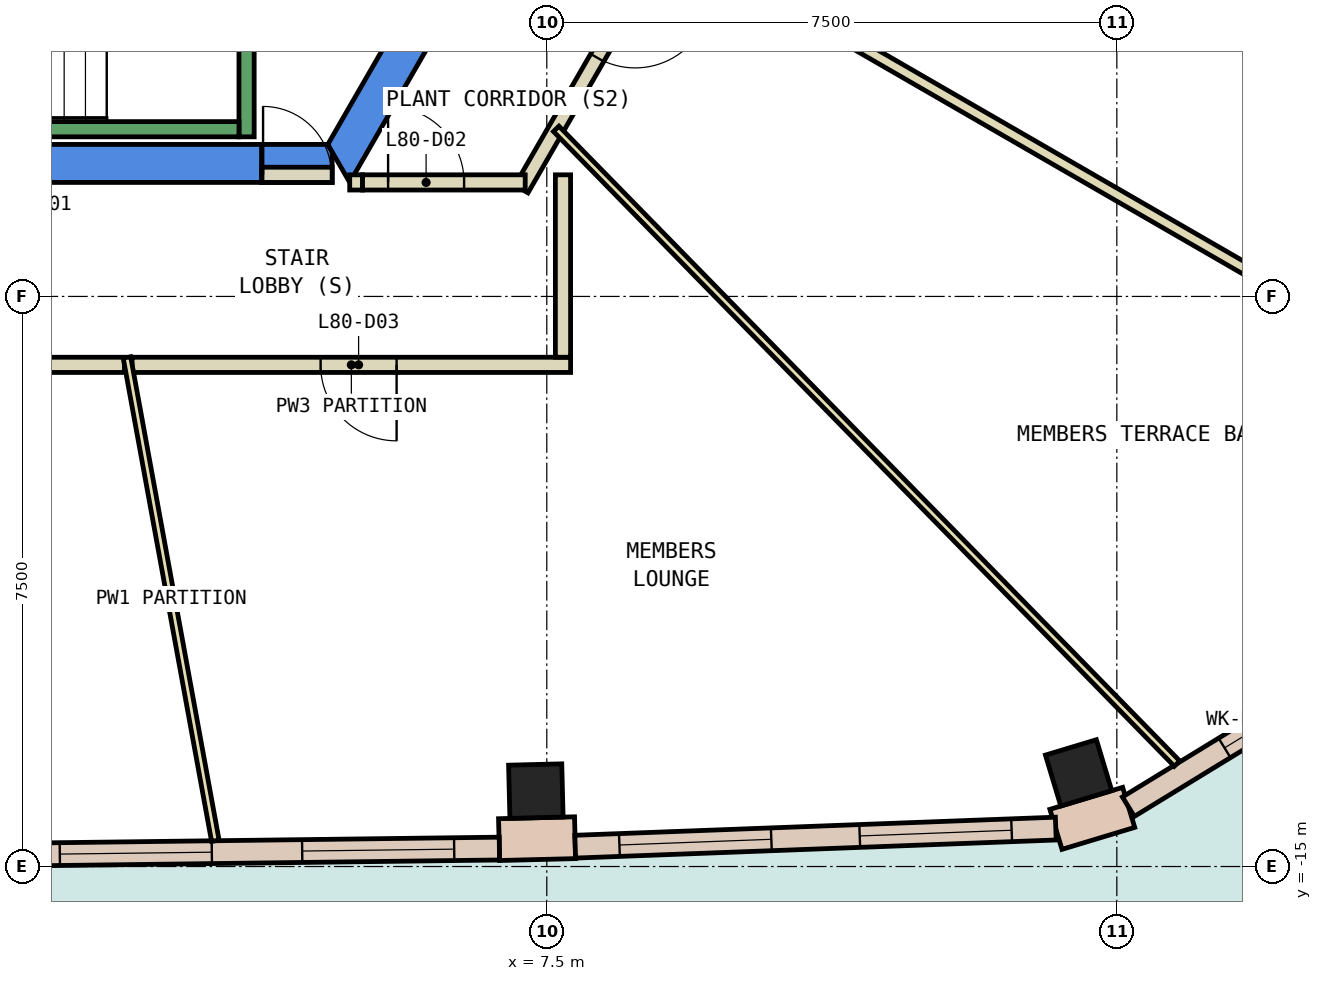
"""IFC4 building model, lengths in metres.
Left out: names, types, materials, properties, quantities, classifications, styles, units other than length and angle.
Written with IfcOpenShell. Run it as: python <this file> out.ifc"""

import sys

from ifc_helpers import new_model, si_unit, direction, frame, frame_2d, origin, origin_2d, place, context, subcontext, project, spatial, polyline, rectangle, outline, extrude, element, fill, save


model = new_model("IFC4")
c1 = context("Model", 3, precision=1e-05, world=origin(), true_north=direction((0.0, 1.0)))
c2 = subcontext(c1, "Body", "Model", "MODEL_VIEW")
j1 = project(units=[si_unit("LENGTHUNIT", "METRE"), si_unit("PLANEANGLEUNIT", "RADIAN")], contexts=[c1])
p1 = place(None, origin())
s1 = spatial("IfcSite", under=j1, at=p1, CompositionType="ELEMENT")
p2 = place(p1, origin())
s2 = spatial("IfcBuilding", under=s1, at=p2, CompositionType="ELEMENT")
p3 = place(p2, frame((0.0, 0.0, 340.4)))
s3 = spatial("IfcBuildingStorey", under=s2, at=p3, CompositionType="ELEMENT", Elevation=340.4)
for number, where, z_axis, x_axis in (
    (1, (7.356, -14.008, 0.0), (0.0, 0.0, 1.0), (1.0, 0.025, 0.0)),
    (2, (14.497, -13.768, 0.0), (0.0, 0.0, 1.0), (0.957, 0.289, 0.0)),
):
    element("IfcColumn", number, at=place(p3, frame(where, z_axis=z_axis, x_axis=x_axis)), inside=s3, PredefinedType="COLUMN", context=c2, shape_type="SweptSolid", body=[
        extrude(rectangle(XDim=0.7, YDim=0.7, at=origin_2d()), origin(), (0.0, 0.0, 1.0), 4.15),
    ])
p4 = place(p3, frame((0.0, 0.0, -0.45)))
e3 = element("IfcWall", 3, at=p4, inside=s3, PredefinedType="SHEAR", context=c2, shape_type="SweptSolid", body=[
    extrude(outline(polyline([(3.75, -6.0), (3.75, -5.5), (-4.619, -5.5), (-4.907, -6.0), (3.75, -6.0)])), origin(), (0.0, 0.0, 1.0), 4.6),
])
p5 = place(p3, frame((0.0, 0.0, 3.6)))
e4 = element("IfcWall", 4, at=p5, inside=s3, PredefinedType="SHEAR", context=c2, shape_type="SweptSolid", body=[
    extrude(outline(polyline([(4.676, -6.0), (4.676, -5.6), (4.619, -5.5), (3.75, -5.5), (3.75, -6.0), (4.676, -6.0)])), origin(), (0.0, 0.0, 1.0), 0.55),
])
p6 = place(p3, frame((0.0, 0.0, -0.45)))
e5 = element("IfcWall", 5, at=p6, inside=s3, PredefinedType="SHEAR", context=c2, shape_type="SweptSolid", body=[
    extrude(outline(polyline([(4.907, -6.0), (9.815, 2.5), (9.238, 2.5), (4.619, -5.5), (4.907, -6.0)])), origin(), (0.0, 0.0, 1.0), 4.6),
])
p7 = place(p3, frame((6.872, -14.646, 0.0), z_axis=(0.0, 0.0, 1.0), x_axis=(0.999690080772, 0.024894626035, 0.0)))
e6 = element("IfcWall", 6, at=p7, inside=s3, PredefinedType="STANDARD", context=c2, shape_type="SweptSolid", body=[
    extrude(rectangle(XDim=1.0, YDim=0.55, at=frame_2d((0.5, 0.0))), origin(), (0.0, 0.0, 1.0), 4.15),
])
p8 = place(p3, frame((14.199, -14.511, 0.0), z_axis=(0.0, 0.0, 1.0), x_axis=(0.957286907321, 0.289139718946, 0.0)))
e7 = element("IfcWall", 7, at=p8, inside=s3, PredefinedType="STANDARD", context=c2, shape_type="SweptSolid", body=[
    extrude(rectangle(XDim=1.0, YDim=0.55, at=frame_2d((0.5, 0.0))), origin(), (0.0, 0.0, 1.0), 4.15),
])
p9 = place(p3, frame((0.499, -14.844, 0.0), z_axis=(0.0, 0.0, 1.0), x_axis=(0.999921164834, 0.012556437292, 0.0)))
e8 = element("IfcWall", 8, at=p9, inside=s3, PredefinedType="STANDARD", context=c2, shape_type="SweptSolid", body=[
    extrude(rectangle(XDim=6.377, YDim=0.3, at=frame_2d((3.189, 0.0))), origin(), (0.0, 0.0, 1.0), 4.15),
])
p10 = place(p9, frame((0.594, 0.0, 0.9)))
e9 = element("IfcOpeningElement", 9, at=p10, cuts=e8, PredefinedType="OPENING", context=c2, shape_type="SweptSolid", body=[
    extrude(rectangle(XDim=2.0, YDim=3.0, at=frame_2d((1.0, 1.5))), frame((0.0, 0.16, 0.0), z_axis=(0.0, -1.0, 0.0), x_axis=(1.0, 0.0, 0.0)), (0.0, 0.0, 1.0), 0.32),
])
p11 = place(p9, frame((3.783, 0.0, 0.9)))
e10 = element("IfcOpeningElement", 10, at=p11, cuts=e8, PredefinedType="OPENING", context=c2, shape_type="SweptSolid", body=[
    extrude(rectangle(XDim=2.0, YDim=3.0, at=frame_2d((1.0, 1.5))), frame((0.0, 0.16, 0.0), z_axis=(0.0, -1.0, 0.0), x_axis=(1.0, 0.0, 0.0)), (0.0, 0.0, 1.0), 0.32),
])
p12 = place(p3, frame((7.874, -14.739, 0.0), z_axis=(0.0, 0.0, 1.0), x_axis=(0.999292132587, 0.03761959262, 0.0)))
e11 = element("IfcWall", 11, at=p12, inside=s3, PredefinedType="STANDARD", context=c2, shape_type="SweptSolid", body=[
    extrude(rectangle(XDim=6.327, YDim=0.3, at=frame_2d((3.164, 0.0))), origin(), (0.0, 0.0, 1.0), 4.15),
])
p13 = place(p12, frame((0.582, 0.0, 0.9)))
e12 = element("IfcOpeningElement", 12, at=p13, cuts=e11, PredefinedType="OPENING", context=c2, shape_type="SweptSolid", body=[
    extrude(rectangle(XDim=2.0, YDim=3.0, at=frame_2d((1.0, 1.5))), frame((0.0, 0.16, 0.0), z_axis=(0.0, -1.0, 0.0), x_axis=(1.0, 0.0, 0.0)), (0.0, 0.0, 1.0), 0.32),
])
p14 = place(p12, frame((3.746, 0.0, 0.9)))
e13 = element("IfcOpeningElement", 13, at=p14, cuts=e11, PredefinedType="OPENING", context=c2, shape_type="SweptSolid", body=[
    extrude(rectangle(XDim=2.0, YDim=3.0, at=frame_2d((1.0, 1.5))), frame((0.0, 0.16, 0.0), z_axis=(0.0, -1.0, 0.0), x_axis=(1.0, 0.0, 0.0)), (0.0, 0.0, 1.0), 0.32),
])
p15 = place(p3, frame((15.152, -14.213, 0.0), z_axis=(0.0, 0.0, 1.0), x_axis=(0.853225151066, 0.521542751448, 0.0)))
e14 = element("IfcWall", 14, at=p15, inside=s3, PredefinedType="STANDARD", context=c2, shape_type="SweptSolid", body=[
    extrude(rectangle(XDim=4.366, YDim=0.3, at=frame_2d((2.183, 0.0))), origin(), (0.0, 0.0, 1.0), 4.15),
])
p16 = place(p15, frame((1.483, 0.0, 0.9)))
e15 = element("IfcOpeningElement", 15, at=p16, cuts=e14, PredefinedType="OPENING", context=c2, shape_type="SweptSolid", body=[
    extrude(rectangle(XDim=1.4, YDim=3.0, at=frame_2d((0.7, 1.5))), frame((0.0, 0.16, 0.0), z_axis=(0.0, -1.0, 0.0), x_axis=(1.0, 0.0, 0.0)), (0.0, 0.0, 1.0), 0.32),
])
p17 = place(p3, frame((19.657, -5.044, 0.0), z_axis=(0.0, 0.0, 1.0), x_axis=(-0.467155191513, 0.884175337274, 0.0)))
e16 = element("IfcWall", 16, at=p17, inside=s3, PredefinedType="STANDARD", context=c2, shape_type="SweptSolid", body=[
    extrude(rectangle(XDim=6.326, YDim=0.3, at=frame_2d((3.163, 0.0))), origin(), (0.0, 0.0, 1.0), 4.15),
])
p18 = place(p17, frame((0.581, 0.0, 0.9)))
e17 = element("IfcOpeningElement", 17, at=p18, cuts=e16, PredefinedType="OPENING", context=c2, shape_type="SweptSolid", body=[
    extrude(rectangle(XDim=2.0, YDim=3.0, at=frame_2d((1.0, 1.5))), frame((0.0, 0.16, 0.0), z_axis=(0.0, -1.0, 0.0), x_axis=(1.0, 0.0, 0.0)), (0.0, 0.0, 1.0), 0.32),
])
p19 = place(p17, frame((3.744, 0.0, 0.9)))
e18 = element("IfcOpeningElement", 18, at=p19, cuts=e16, PredefinedType="OPENING", context=c2, shape_type="SweptSolid", body=[
    extrude(rectangle(XDim=2.0, YDim=3.0, at=frame_2d((1.0, 1.5))), frame((0.0, 0.16, 0.0), z_axis=(0.0, -1.0, 0.0), x_axis=(1.0, 0.0, 0.0)), (0.0, 0.0, 1.0), 0.32),
])
p20 = place(p3, frame((4.907, -6.0, 0.0), z_axis=(0.0, 0.0, 1.0), x_axis=(1.0, 0.0, 0.0)))
e19 = element("IfcWall", 19, at=p20, inside=s3, PredefinedType="PARTITIONING", context=c2, shape_type="SweptSolid", body=[
    extrude(rectangle(XDim=0.169, YDim=0.2, at=frame_2d((0.084, 0.0))), origin(), (0.0, 0.0, 1.0), 2.4),
])
p21 = place(p3, frame((7.813, -8.4, 0.0), z_axis=(0.0, 0.0, 1.0), x_axis=(-1.0, 0.0, 0.0)))
e20 = element("IfcWall", 20, at=p21, inside=s3, PredefinedType="PARTITIONING", context=c2, shape_type="SweptSolid", body=[
    extrude(rectangle(XDim=5.769, YDim=0.2, at=frame_2d((2.885, 0.0))), origin(), (0.0, 0.0, 1.0), 4.15),
])
p22 = place(p21, frame((2.289, 0.0, 0.0)))
e21 = element("IfcOpeningElement", 21, at=p22, cuts=e20, PredefinedType="OPENING", context=c2, shape_type="SweptSolid", body=[
    extrude(rectangle(XDim=1.0, YDim=2.1, at=frame_2d((0.5, 1.05))), frame((0.0, 0.11, 0.0), z_axis=(0.0, -1.0, 0.0), x_axis=(1.0, 0.0, 0.0)), (0.0, 0.0, 1.0), 0.22),
])
p23 = place(p3, frame((7.713, -5.9, 0.0), z_axis=(0.0, 0.0, 1.0), x_axis=(0.0, -1.0, 0.0)))
e22 = element("IfcWall", 22, at=p23, inside=s3, PredefinedType="PARTITIONING", context=c2, shape_type="SweptSolid", body=[
    extrude(rectangle(XDim=2.4, YDim=0.2, at=frame_2d((1.2, 0.0))), origin(), (0.0, 0.0, 1.0), 4.15),
])
p24 = place(p3, frame((1.944, -8.4, 0.0), z_axis=(0.0, 0.0, 1.0), x_axis=(-1.0, 0.0, 0.0)))
e23 = element("IfcWall", 23, at=p24, inside=s3, PredefinedType="PARTITIONING", context=c2, shape_type="SweptSolid", body=[
    extrude(rectangle(XDim=1.331, YDim=0.2, at=frame_2d((0.666, 0.0))), origin(), (0.0, 0.0, 1.0), 4.15),
])
p25 = place(p3, frame((9.106, -2.728, 0.0), z_axis=(0.0, 0.0, 1.0), x_axis=(-0.500132879116, -0.865948672398, 0.0)))
e24 = element("IfcWall", 24, at=p25, inside=s3, PredefinedType="PARTITIONING", context=c2, shape_type="SweptSolid", body=[
    extrude(rectangle(XDim=3.879, YDim=0.2, at=frame_2d((1.939, 0.0))), origin(), (0.0, 0.0, 1.0), 4.15),
])
p26 = place(p25, frame((0.884, 0.0, 0.0)))
e25 = element("IfcOpeningElement", 25, at=p26, cuts=e24, PredefinedType="OPENING", context=c2, shape_type="SweptSolid", body=[
    extrude(rectangle(XDim=1.0, YDim=2.1, at=frame_2d((0.5, 1.05))), frame((0.0, 0.11, 0.0), z_axis=(0.0, -1.0, 0.0), x_axis=(1.0, 0.0, 0.0)), (0.0, 0.0, 1.0), 0.22),
])
p27 = place(p3, frame((3.139, -14.661, 0.0), z_axis=(0.0, 0.0, 1.0), x_axis=(-0.179885726398, 0.983687514121, 0.0)))
e26 = element("IfcWall", 26, at=p27, inside=s3, PredefinedType="PARTITIONING", context=c2, shape_type="SweptSolid", body=[
    extrude(rectangle(XDim=6.464, YDim=0.1, at=frame_2d((3.232, 0.0))), origin(), (0.0, 0.0, 1.0), 4.15),
])
p28 = place(p3, frame((7.624, -5.295, 0.0), z_axis=(0.0, 0.0, 1.0), x_axis=(0.699225895869, -0.714900794898, 0.0)))
e27 = element("IfcWall", 27, at=p28, inside=s3, PredefinedType="PARTITIONING", context=c2, shape_type="SweptSolid", body=[
    extrude(rectangle(XDim=11.681, YDim=0.1, at=frame_2d((5.841, 0.0))), origin(), (0.0, 0.0, 1.0), 4.15),
])
p29 = place(p3, frame((19.664, -8.853, 0.0), z_axis=(0.0, 0.0, 1.0), x_axis=(-0.866035935173, 0.499981758657, 0.0)))
e28 = element("IfcWall", 28, at=p29, inside=s3, PredefinedType="PARTITIONING", context=c2, shape_type="SweptSolid", body=[
    extrude(rectangle(XDim=12.307, YDim=0.15, at=frame_2d((6.153, 0.0))), origin(), (0.0, 0.0, 1.0), 4.15),
])
p30 = place(p3, frame((3.75, -5.9, 0.0), z_axis=(0.0, 0.0, 1.0), x_axis=(1.0, 0.0, 0.0)))
e29 = element("IfcWall", 29, at=p30, inside=s3, PredefinedType="PARTITIONING", context=c2, shape_type="SweptSolid", body=[
    extrude(rectangle(XDim=0.926, YDim=0.2, at=frame_2d((0.463, 0.0))), origin(), (0.0, 0.0, 1.0), 2.4),
])
p31 = place(p30, frame((0.017, 0.0, 0.0)))
e30 = element("IfcOpeningElement", 30, at=p31, cuts=e29, PredefinedType="OPENING", context=c2, shape_type="SweptSolid", body=[
    extrude(rectangle(XDim=0.9, YDim=2.1, at=frame_2d((0.45, 1.05))), frame((0.0, 0.11, 0.0), z_axis=(0.0, -1.0, 0.0), x_axis=(1.0, 0.0, 0.0)), (0.0, 0.0, 1.0), 0.22),
])
p32 = place(p3, frame((5.076, -6.0, 0.0), z_axis=(0.0, 0.0, 1.0), x_axis=(1.0, 0.0, 0.0)))
e31 = element("IfcWall", 31, at=p32, inside=s3, PredefinedType="PARTITIONING", context=c2, shape_type="SweptSolid", body=[
    extrude(rectangle(XDim=2.14, YDim=0.2, at=frame_2d((1.07, 0.0))), origin(), (0.0, 0.0, 1.0), 4.15),
])
p33 = place(p32, frame((0.336, 0.0, 0.0)))
e32 = element("IfcOpeningElement", 32, at=p33, cuts=e31, PredefinedType="OPENING", context=c2, shape_type="SweptSolid", body=[
    extrude(rectangle(XDim=1.0, YDim=2.1, at=frame_2d((0.5, 1.05))), frame((0.0, 0.11, 0.0), z_axis=(0.0, -1.0, 0.0), x_axis=(1.0, 0.0, 0.0)), (0.0, 0.0, 1.0), 0.22),
])
p34 = place(p3, frame((3.55, -2.667, 0.0), z_axis=(0.0, 0.0, 1.0), x_axis=(0.0, -1.0, 0.0)))
e33 = element("IfcWall", 33, at=p34, inside=s3, PredefinedType="STANDARD", context=c2, shape_type="SweptSolid", body=[
    extrude(rectangle(XDim=2.733, YDim=0.2, at=frame_2d((1.366, 0.0))), origin(), (0.0, 0.0, 1.0), 4.15),
])
p35 = place(p3, frame((-3.45, -5.3, 0.0), z_axis=(0.0, 0.0, 1.0), x_axis=(1.0, 0.0, 0.0)))
e34 = element("IfcWall", 34, at=p35, inside=s3, PredefinedType="STANDARD", context=c2, shape_type="SweptSolid", body=[
    extrude(rectangle(XDim=6.9, YDim=0.2, at=frame_2d((3.45, 0.0))), origin(), (0.0, 0.0, 1.0), 4.15),
])
p36 = place(p10, origin())
e35 = element("IfcWindow", 35, at=p36, inside=s3, PartitioningType="SINGLE_PANEL", PredefinedType="WINDOW", context=c2, shape_type="SweptSolid", body=[
    extrude(rectangle(XDim=2.0, YDim=3.0, at=frame_2d((1.0, 1.5))), frame((0.0, 0.03, 0.0), z_axis=(0.0, -1.0, 0.0), x_axis=(1.0, 0.0, 0.0)), (0.0, 0.0, 1.0), 0.06),
])
fill(e9, e35)
p37 = place(p11, origin())
e36 = element("IfcWindow", 36, at=p37, inside=s3, PartitioningType="SINGLE_PANEL", PredefinedType="WINDOW", context=c2, shape_type="SweptSolid", body=[
    extrude(rectangle(XDim=2.0, YDim=3.0, at=frame_2d((1.0, 1.5))), frame((0.0, 0.03, 0.0), z_axis=(0.0, -1.0, 0.0), x_axis=(1.0, 0.0, 0.0)), (0.0, 0.0, 1.0), 0.06),
])
fill(e10, e36)
p38 = place(p13, origin())
e37 = element("IfcWindow", 37, at=p38, inside=s3, PartitioningType="SINGLE_PANEL", PredefinedType="WINDOW", context=c2, shape_type="SweptSolid", body=[
    extrude(rectangle(XDim=2.0, YDim=3.0, at=frame_2d((1.0, 1.5))), frame((0.0, 0.03, 0.0), z_axis=(0.0, -1.0, 0.0), x_axis=(1.0, 0.0, 0.0)), (0.0, 0.0, 1.0), 0.06),
])
fill(e12, e37)
p39 = place(p14, origin())
e38 = element("IfcWindow", 38, at=p39, inside=s3, PartitioningType="SINGLE_PANEL", PredefinedType="WINDOW", context=c2, shape_type="SweptSolid", body=[
    extrude(rectangle(XDim=2.0, YDim=3.0, at=frame_2d((1.0, 1.5))), frame((0.0, 0.03, 0.0), z_axis=(0.0, -1.0, 0.0), x_axis=(1.0, 0.0, 0.0)), (0.0, 0.0, 1.0), 0.06),
])
fill(e13, e38)
p40 = place(p16, origin())
e39 = element("IfcWindow", 39, at=p40, inside=s3, PartitioningType="SINGLE_PANEL", PredefinedType="WINDOW", context=c2, shape_type="SweptSolid", body=[
    extrude(rectangle(XDim=1.4, YDim=3.0, at=frame_2d((0.7, 1.5))), frame((0.0, 0.03, 0.0), z_axis=(0.0, -1.0, 0.0), x_axis=(1.0, 0.0, 0.0)), (0.0, 0.0, 1.0), 0.06),
])
fill(e15, e39)
p41 = place(p33, origin())
e40 = element("IfcDoor", 40, at=p41, inside=s3, OperationType="SINGLE_SWING_RIGHT", PredefinedType="DOOR", context=c2, shape_type="SweptSolid", body=[
    extrude(rectangle(XDim=1.0, YDim=2.1, at=frame_2d((0.5, 1.05))), frame((0.0, 0.025, 0.0), z_axis=(0.0, -1.0, 0.0), x_axis=(1.0, 0.0, 0.0)), (0.0, 0.0, 1.0), 0.05),
])
fill(e32, e40)
p42 = place(p22, origin())
e41 = element("IfcDoor", 41, at=p42, inside=s3, OperationType="SINGLE_SWING_LEFT", PredefinedType="DOOR", context=c2, shape_type="SweptSolid", body=[
    extrude(rectangle(XDim=1.0, YDim=2.1, at=frame_2d((0.5, 1.05))), frame((0.0, 0.025, 0.0), z_axis=(0.0, -1.0, 0.0), x_axis=(1.0, 0.0, 0.0)), (0.0, 0.0, 1.0), 0.05),
])
fill(e21, e41)
p43 = place(p26, origin())
e42 = element("IfcDoor", 42, at=p43, inside=s3, OperationType="SINGLE_SWING_LEFT", PredefinedType="DOOR", context=c2, shape_type="SweptSolid", body=[
    extrude(rectangle(XDim=1.0, YDim=2.1, at=frame_2d((0.5, 1.05))), frame((0.0, 0.025, 0.0), z_axis=(0.0, -1.0, 0.0), x_axis=(1.0, 0.0, 0.0)), (0.0, 0.0, 1.0), 0.05),
])
fill(e25, e42)
p44 = place(p31, origin())
e43 = element("IfcDoor", 43, at=p44, inside=s3, OperationType="SINGLE_SWING_LEFT", PredefinedType="DOOR", context=c2, shape_type="SweptSolid", body=[
    extrude(rectangle(XDim=0.9, YDim=2.1, at=frame_2d((0.45, 1.05))), frame((0.0, 0.025, 0.0), z_axis=(0.0, -1.0, 0.0), x_axis=(1.0, 0.0, 0.0)), (0.0, 0.0, 1.0), 0.05),
])
fill(e30, e43)
save(model, sys.argv[1])
